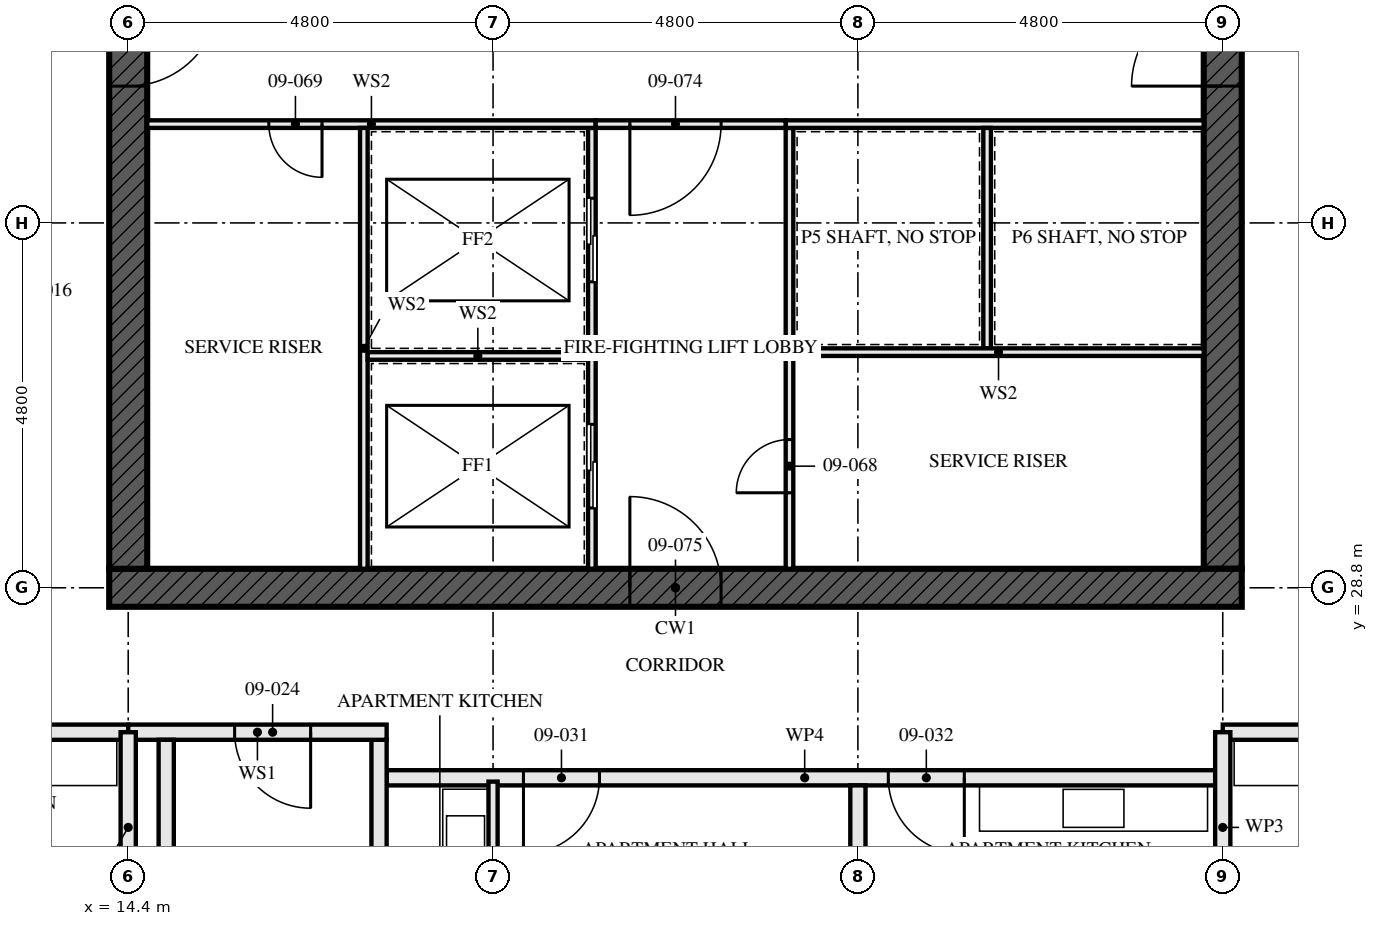
"""IFC4 building model, lengths in metres.
Left out: names, types, materials, properties, quantities, classifications, styles, units other than length and angle.
Written with IfcOpenShell. Run it as: python <this file> out.ifc"""

import sys

from ifc_helpers import new_model, si_unit, direction, frame, frame_2d, origin, place, context, subcontext, project, spatial, rectangle, extrude, element, fill, save


model = new_model("IFC4")
c1 = context("Model", 3, precision=1e-05, world=origin(), true_north=direction((0.0, 1.0)))
c2 = subcontext(c1, "Body", "Model", "MODEL_VIEW")
j1 = project(units=[si_unit("LENGTHUNIT", "METRE"), si_unit("PLANEANGLEUNIT", "RADIAN")], contexts=[c1])
p1 = place(None, origin())
s1 = spatial("IfcSite", under=j1, at=p1, CompositionType="ELEMENT")
p2 = place(p1, origin())
s2 = spatial("IfcBuilding", under=s1, at=p2, CompositionType="ELEMENT")
p3 = place(p2, frame((0.0, 0.0, 37.5)))
s3 = spatial("IfcBuildingStorey", under=s2, at=p3, CompositionType="ELEMENT", Elevation=37.5)
p4 = place(p3, frame((14.15, 28.8, -0.17), z_axis=(0.0, 0.0, 1.0), x_axis=(1.0, 0.0, 0.0)))
e1 = element("IfcWall", 1, at=p4, inside=s3, PredefinedType="SHEAR", context=c2, shape_type="SweptSolid", body=[
    extrude(rectangle(XDim=14.9, YDim=0.5, at=frame_2d((7.45, 0.0))), origin(), (0.0, 0.0, 1.0), 3.5),
])
p5 = place(p4, frame((6.85, 0.0, 0.17)))
e2 = element("IfcOpeningElement", 2, at=p5, cuts=e1, PredefinedType="OPENING", context=c2, shape_type="SweptSolid", body=[
    extrude(rectangle(XDim=1.2, YDim=2.1, at=frame_2d((0.6, 1.05))), frame((0.0, 0.26, 0.0), z_axis=(0.0, -1.0, 0.0), x_axis=(1.0, 0.0, 0.0)), (0.0, 0.0, 1.0), 0.521),
])
p6 = place(p3, frame((14.4, 42.95, -0.17), z_axis=(0.0, 0.0, 1.0), x_axis=(0.0, -1.0, 0.0)))
e3 = element("IfcWall", 3, at=p6, inside=s3, PredefinedType="SHEAR", context=c2, shape_type="SweptSolid", body=[
    extrude(rectangle(XDim=13.9, YDim=0.5, at=frame_2d((6.95, 0.0))), origin(), (0.0, 0.0, 1.0), 3.5),
])
p7 = place(p6, frame((6.35, 0.0, 0.17)))
e4 = element("IfcOpeningElement", 4, at=p7, cuts=e3, PredefinedType="OPENING", context=c2, shape_type="SweptSolid", body=[
    extrude(rectangle(XDim=1.2, YDim=2.1, at=frame_2d((0.6, 1.05))), frame((0.0, 0.26, 0.0), z_axis=(0.0, -1.0, 0.0), x_axis=(1.0, 0.0, 0.0)), (0.0, 0.0, 1.0), 0.521),
])
p8 = place(p3, frame((28.8, 29.05, -0.17), z_axis=(0.0, 0.0, 1.0), x_axis=(0.0, 1.0, 0.0)))
e5 = element("IfcWall", 5, at=p8, inside=s3, PredefinedType="SHEAR", context=c2, shape_type="SweptSolid", body=[
    extrude(rectangle(XDim=13.9, YDim=0.5, at=frame_2d((6.95, 0.0))), origin(), (0.0, 0.0, 1.0), 3.5),
])
p9 = place(p8, frame((6.35, 0.0, 0.17)))
e6 = element("IfcOpeningElement", 6, at=p9, cuts=e5, PredefinedType="OPENING", context=c2, shape_type="SweptSolid", body=[
    extrude(rectangle(XDim=1.2, YDim=2.1, at=frame_2d((0.6, 1.05))), frame((0.0, 0.26, 0.0), z_axis=(0.0, -1.0, 0.0), x_axis=(1.0, 0.0, 0.0)), (0.0, 0.0, 1.0), 0.521),
])
p10 = place(p3, frame((4.8, 26.9, 0.0), z_axis=(0.0, 0.0, 1.0), x_axis=(1.0, 0.0, 0.0)))
e7 = element("IfcWall", 7, at=p10, inside=s3, PredefinedType="PARTITIONING", context=c2, shape_type="SweptSolid", body=[
    extrude(rectangle(XDim=9.6, YDim=0.2, at=frame_2d((4.8, 0.0))), origin(), (0.0, 0.0, 1.0), 3.33),
])
p11 = place(p10, frame((0.4, 0.0, 0.0)))
e8 = element("IfcOpeningElement", 8, at=p11, cuts=e7, PredefinedType="OPENING", context=c2, shape_type="SweptSolid", body=[
    extrude(rectangle(XDim=1.0, YDim=2.1, at=frame_2d((0.5, 1.05))), frame((0.0, 0.111, 0.0), z_axis=(0.0, -1.0, 0.0), x_axis=(1.0, 0.0, 0.0)), (0.0, 0.0, 1.0), 0.221),
])
p12 = place(p10, frame((5.2, 0.0, 0.0)))
e9 = element("IfcOpeningElement", 9, at=p12, cuts=e7, PredefinedType="OPENING", context=c2, shape_type="SweptSolid", body=[
    extrude(rectangle(XDim=1.0, YDim=2.1, at=frame_2d((0.5, 1.05))), frame((0.0, 0.111, 0.0), z_axis=(0.0, -1.0, 0.0), x_axis=(1.0, 0.0, 0.0)), (0.0, 0.0, 1.0), 0.221),
])
for number, where, z_axis, x_axis in (
    (10, (14.9, 22.1, 0.0), (0.0, 0.0, 1.0), (0.0, 1.0, 0.0)),
    (11, (17.7, 22.1, 0.0), (0.0, 0.0, 1.0), (0.0, 1.0, 0.0)),
):
    element("IfcWall", number, at=place(p3, frame(where, z_axis=z_axis, x_axis=x_axis)), inside=s3, PredefinedType="SOLIDWALL", context=c2, shape_type="SweptSolid", body=[
        extrude(rectangle(XDim=4.7, YDim=0.2, at=frame_2d((2.35, 0.0))), origin(), (0.0, 0.0, 1.0), 2.99),
    ])
p13 = place(p3, frame((14.4, 26.9, 0.0), z_axis=(0.0, 0.0, 1.0), x_axis=(1.0, 0.0, 0.0)))
e12 = element("IfcWall", 12, at=p13, inside=s3, PredefinedType="SOLIDWALL", context=c2, shape_type="SweptSolid", body=[
    extrude(rectangle(XDim=3.4, YDim=0.2, at=frame_2d((1.7, 0.0))), origin(), (0.0, 0.0, 1.0), 3.33),
])
p14 = place(p13, frame((1.4, 0.0, 0.0)))
e13 = element("IfcOpeningElement", 13, at=p14, cuts=e12, PredefinedType="OPENING", context=c2, shape_type="SweptSolid", body=[
    extrude(rectangle(XDim=1.0, YDim=2.1, at=frame_2d((0.5, 1.05))), frame((0.0, 0.111, 0.0), z_axis=(0.0, -1.0, 0.0), x_axis=(1.0, 0.0, 0.0)), (0.0, 0.0, 1.0), 0.221),
])
p15 = place(p3, frame((19.2, 21.6, 0.0), z_axis=(0.0, 0.0, 1.0), x_axis=(0.0, 1.0, 0.0)))
e14 = element("IfcWall", 14, at=p15, inside=s3, PredefinedType="PARTITIONING", context=c2, shape_type="SweptSolid", body=[
    extrude(rectangle(XDim=4.65, YDim=0.12, at=frame_2d((2.325, 0.0))), origin(), (0.0, 0.0, 1.0), 2.55),
])
p16 = place(p15, frame((1.875, 0.0, 0.0)))
e15 = element("IfcOpeningElement", 15, at=p16, cuts=e14, PredefinedType="OPENING", context=c2, shape_type="SweptSolid", body=[
    extrude(rectangle(XDim=0.9, YDim=2.1, at=frame_2d((0.45, 1.05))), frame((0.0, 0.071, 0.0), z_axis=(0.0, -1.0, 0.0), x_axis=(1.0, 0.0, 0.0)), (0.0, 0.0, 1.0), 0.141),
])
p17 = place(p3, frame((24.0, 14.795, 0.0), z_axis=(0.0, 0.0, 1.0), x_axis=(0.0, 1.0, 0.0)))
e16 = element("IfcWall", 16, at=p17, inside=s3, PredefinedType="PARTITIONING", context=c2, shape_type="SweptSolid", body=[
    extrude(rectangle(XDim=11.405, YDim=0.2, at=frame_2d((5.703, 0.0))), origin(), (0.0, 0.0, 1.0), 2.55),
])
p18 = place(p3, frame((17.8, 26.3, 0.0), z_axis=(0.0, 0.0, 1.0), x_axis=(1.0, 0.0, 0.0)))
e17 = element("IfcWall", 17, at=p18, inside=s3, PredefinedType="PARTITIONING", context=c2, shape_type="SweptSolid", body=[
    extrude(rectangle(XDim=11.0, YDim=0.2, at=frame_2d((5.5, 0.0))), origin(), (0.0, 0.0, 1.0), 2.55),
])
p19 = place(p18, frame((1.8, 0.0, 0.0)))
e18 = element("IfcOpeningElement", 18, at=p19, cuts=e17, PredefinedType="OPENING", context=c2, shape_type="SweptSolid", body=[
    extrude(rectangle(XDim=1.0, YDim=2.1, at=frame_2d((0.5, 1.05))), frame((0.0, 0.111, 0.0), z_axis=(0.0, -1.0, 0.0), x_axis=(1.0, 0.0, 0.0)), (0.0, 0.0, 1.0), 0.221),
])
p20 = place(p18, frame((6.6, 0.0, 0.0)))
e19 = element("IfcOpeningElement", 19, at=p20, cuts=e17, PredefinedType="OPENING", context=c2, shape_type="SweptSolid", body=[
    extrude(rectangle(XDim=1.0, YDim=2.1, at=frame_2d((0.5, 1.05))), frame((0.0, 0.111, 0.0), z_axis=(0.0, -1.0, 0.0), x_axis=(1.0, 0.0, 0.0)), (0.0, 0.0, 1.0), 0.221),
])
p21 = place(p3, frame((28.8, 26.9, 0.0), z_axis=(0.0, 0.0, 1.0), x_axis=(1.0, 0.0, 0.0)))
e20 = element("IfcWall", 20, at=p21, inside=s3, PredefinedType="PARTITIONING", context=c2, shape_type="SweptSolid", body=[
    extrude(rectangle(XDim=9.6, YDim=0.2, at=frame_2d((4.8, 0.0))), origin(), (0.0, 0.0, 1.0), 3.33),
])
p22 = place(p21, frame((5.2, 0.0, 0.0)))
e21 = element("IfcOpeningElement", 21, at=p22, cuts=e20, PredefinedType="OPENING", context=c2, shape_type="SweptSolid", body=[
    extrude(rectangle(XDim=1.0, YDim=2.1, at=frame_2d((0.5, 1.05))), frame((0.0, 0.111, 0.0), z_axis=(0.0, -1.0, 0.0), x_axis=(1.0, 0.0, 0.0)), (0.0, 0.0, 1.0), 0.221),
])
p23 = place(p3, frame((20.5, 29.05, 0.0), z_axis=(0.0, 0.0, 1.0), x_axis=(0.0, 1.0, 0.0)))
e22 = element("IfcWall", 22, at=p23, inside=s3, PredefinedType="SOLIDWALL", context=c2, shape_type="SweptSolid", body=[
    extrude(rectangle(XDim=5.8, YDim=0.1, at=frame_2d((2.9, 0.0))), origin(), (0.0, 0.0, 1.0), 3.33),
])
p24 = place(p23, frame((0.8, 0.0, 0.0)))
e23 = element("IfcOpeningElement", 23, at=p24, cuts=e22, PredefinedType="OPENING", context=c2, shape_type="SweptSolid", body=[
    extrude(rectangle(XDim=1.1, YDim=2.3, at=frame_2d((0.55, 1.15))), frame((0.0, 0.061, 0.0), z_axis=(0.0, -1.0, 0.0), x_axis=(1.0, 0.0, 0.0)), (0.0, 0.0, 1.0), 0.121),
])
p25 = place(p23, frame((3.775, 0.0, 0.0)))
e24 = element("IfcOpeningElement", 24, at=p25, cuts=e22, PredefinedType="OPENING", context=c2, shape_type="SweptSolid", body=[
    extrude(rectangle(XDim=1.1, YDim=2.3, at=frame_2d((0.55, 1.15))), frame((0.0, 0.061, 0.0), z_axis=(0.0, -1.0, 0.0), x_axis=(1.0, 0.0, 0.0)), (0.0, 0.0, 1.0), 0.121),
])
p26 = place(p3, frame((23.1, 29.05, 0.0), z_axis=(0.0, 0.0, 1.0), x_axis=(0.0, 1.0, 0.0)))
e25 = element("IfcWall", 25, at=p26, inside=s3, PredefinedType="SOLIDWALL", context=c2, shape_type="SweptSolid", body=[
    extrude(rectangle(XDim=5.8, YDim=0.1, at=frame_2d((2.9, 0.0))), origin(), (0.0, 0.0, 1.0), 3.33),
])
p27 = place(p26, frame((1.0, 0.0, 0.0)))
e26 = element("IfcOpeningElement", 26, at=p27, cuts=e25, PredefinedType="OPENING", context=c2, shape_type="SweptSolid", body=[
    extrude(rectangle(XDim=0.7, YDim=2.1, at=frame_2d((0.35, 1.05))), frame((0.0, 0.061, 0.0), z_axis=(0.0, -1.0, 0.0), x_axis=(1.0, 0.0, 0.0)), (0.0, 0.0, 1.0), 0.121),
])
p28 = place(p3, frame((14.65, 34.9, 0.0), z_axis=(0.0, 0.0, 1.0), x_axis=(1.0, 0.0, 0.0)))
e27 = element("IfcWall", 27, at=p28, inside=s3, PredefinedType="SOLIDWALL", context=c2, shape_type="SweptSolid", body=[
    extrude(rectangle(XDim=5.9, YDim=0.1, at=frame_2d((2.95, 0.0))), origin(), (0.0, 0.0, 1.0), 3.33),
])
p29 = place(p28, frame((1.6, 0.0, 0.0)))
e28 = element("IfcOpeningElement", 28, at=p29, cuts=e27, PredefinedType="OPENING", context=c2, shape_type="SweptSolid", body=[
    extrude(rectangle(XDim=0.7, YDim=2.1, at=frame_2d((0.35, 1.05))), frame((0.0, 0.061, 0.0), z_axis=(0.0, -1.0, 0.0), x_axis=(1.0, 0.0, 0.0)), (0.0, 0.0, 1.0), 0.121),
])
p30 = place(p3, frame((23.05, 34.9, 0.0), z_axis=(0.0, 0.0, 1.0), x_axis=(1.0, 0.0, 0.0)))
e29 = element("IfcWall", 29, at=p30, inside=s3, PredefinedType="SOLIDWALL", context=c2, shape_type="SweptSolid", body=[
    extrude(rectangle(XDim=5.5, YDim=0.1, at=frame_2d((2.75, 0.0))), origin(), (0.0, 0.0, 1.0), 3.33),
])
p31 = place(p3, frame((20.55, 34.9, 0.0), z_axis=(0.0, 0.0, 1.0), x_axis=(1.0, 0.0, 0.0)))
e30 = element("IfcWall", 30, at=p31, inside=s3, PredefinedType="SOLIDWALL", context=c2, shape_type="SweptSolid", body=[
    extrude(rectangle(XDim=2.5, YDim=0.1, at=frame_2d((1.25, 0.0))), origin(), (0.0, 0.0, 1.0), 3.33),
])
p32 = place(p31, frame((0.45, 0.0, 0.0)))
e31 = element("IfcOpeningElement", 31, at=p32, cuts=e30, PredefinedType="OPENING", context=c2, shape_type="SweptSolid", body=[
    extrude(rectangle(XDim=1.2, YDim=2.1, at=frame_2d((0.6, 1.05))), frame((0.0, 0.061, 0.0), z_axis=(0.0, -1.0, 0.0), x_axis=(1.0, 0.0, 0.0)), (0.0, 0.0, 1.0), 0.121),
])
p33 = place(p3, frame((17.5, 29.05, 0.0), z_axis=(0.0, 0.0, 1.0), x_axis=(0.0, 1.0, 0.0)))
e32 = element("IfcWall", 32, at=p33, inside=s3, PredefinedType="SOLIDWALL", context=c2, shape_type="SweptSolid", body=[
    extrude(rectangle(XDim=5.8, YDim=0.1, at=frame_2d((2.9, 0.0))), origin(), (0.0, 0.0, 1.0), 3.33),
])
p34 = place(p3, frame((17.55, 31.85, 0.0), z_axis=(0.0, 0.0, 1.0), x_axis=(1.0, 0.0, 0.0)))
e33 = element("IfcWall", 33, at=p34, inside=s3, PredefinedType="SOLIDWALL", context=c2, shape_type="SweptSolid", body=[
    extrude(rectangle(XDim=2.9, YDim=0.1, at=frame_2d((1.45, 0.0))), origin(), (0.0, 0.0, 1.0), 3.33),
])
p35 = place(p3, frame((25.7, 31.95, 0.0), z_axis=(0.0, 0.0, 1.0), x_axis=(0.0, 1.0, 0.0)))
e34 = element("IfcWall", 34, at=p35, inside=s3, PredefinedType="SOLIDWALL", context=c2, shape_type="SweptSolid", body=[
    extrude(rectangle(XDim=2.9, YDim=0.1, at=frame_2d((1.45, 0.0))), origin(), (0.0, 0.0, 1.0), 3.33),
])
p36 = place(p3, frame((23.15, 31.9, 0.0), z_axis=(0.0, 0.0, 1.0), x_axis=(1.0, 0.0, 0.0)))
e35 = element("IfcWall", 35, at=p36, inside=s3, PredefinedType="SOLIDWALL", context=c2, shape_type="SweptSolid", body=[
    extrude(rectangle(XDim=5.4, YDim=0.1, at=frame_2d((2.7, 0.0))), origin(), (0.0, 0.0, 1.0), 3.33),
])
for number, where, z_axis, x_axis in (
    (36, (14.4, 24.395, 0.0), (0.0, 0.0, 1.0), (0.0, 1.0, 0.0)),
    (37, (28.8, 24.395, 0.0), (0.0, 0.0, 1.0), (0.0, 1.0, 0.0)),
):
    element("IfcWall", number, at=place(p3, frame(where, z_axis=z_axis, x_axis=x_axis)), inside=s3, PredefinedType="PARTITIONING", context=c2, shape_type="SweptSolid", body=[
        extrude(rectangle(XDim=2.505, YDim=0.2, at=frame_2d((1.252, 0.0))), origin(), (0.0, 0.0, 1.0), 2.32),
    ])
p37 = place(p14, frame((1.0, 0.0, 0.0), z_axis=(0.0, 0.0, 1.0), x_axis=(-1.0, 0.0, 0.0)))
e38 = element("IfcDoor", 38, at=p37, inside=s3, OperationType="SINGLE_SWING_RIGHT", PredefinedType="DOOR", context=c2, shape_type="SweptSolid", body=[
    extrude(rectangle(XDim=1.0, YDim=2.1, at=frame_2d((0.5, 1.05))), frame((0.0, 0.032, 0.0), z_axis=(0.0, -1.0, 0.0), x_axis=(1.0, 0.0, 0.0)), (0.0, 0.0, 1.0), 0.064),
])
fill(e13, e38)
p38 = place(p19, frame((1.0, 0.0, 0.0), z_axis=(0.0, 0.0, 1.0), x_axis=(-1.0, 0.0, 0.0)))
e39 = element("IfcDoor", 39, at=p38, inside=s3, OperationType="SINGLE_SWING_LEFT", PredefinedType="DOOR", context=c2, shape_type="SweptSolid", body=[
    extrude(rectangle(XDim=1.0, YDim=2.1, at=frame_2d((0.5, 1.05))), frame((0.0, 0.027, 0.0), z_axis=(0.0, -1.0, 0.0), x_axis=(1.0, 0.0, 0.0)), (0.0, 0.0, 1.0), 0.054),
])
fill(e18, e39)
p39 = place(p20, frame((1.0, 0.0, 0.0), z_axis=(0.0, 0.0, 1.0), x_axis=(-1.0, 0.0, 0.0)))
e40 = element("IfcDoor", 40, at=p39, inside=s3, OperationType="SINGLE_SWING_RIGHT", PredefinedType="DOOR", context=c2, shape_type="SweptSolid", body=[
    extrude(rectangle(XDim=1.0, YDim=2.1, at=frame_2d((0.5, 1.05))), frame((0.0, 0.027, 0.0), z_axis=(0.0, -1.0, 0.0), x_axis=(1.0, 0.0, 0.0)), (0.0, 0.0, 1.0), 0.054),
])
fill(e19, e40)
p40 = place(p24, origin())
e41 = element("IfcDoor", 41, at=p40, inside=s3, OperationType="SLIDING_TO_LEFT", PredefinedType="DOOR", context=c2, shape_type="SweptSolid", body=[
    extrude(rectangle(XDim=1.1, YDim=2.3, at=frame_2d((0.55, 1.15))), frame((0.0, 0.05, 0.0), z_axis=(0.0, -1.0, 0.0), x_axis=(1.0, 0.0, 0.0)), (0.0, 0.0, 1.0), 0.1),
])
fill(e23, e41)
p41 = place(p25, origin())
e42 = element("IfcDoor", 42, at=p41, inside=s3, OperationType="SLIDING_TO_LEFT", PredefinedType="DOOR", context=c2, shape_type="SweptSolid", body=[
    extrude(rectangle(XDim=1.1, YDim=2.3, at=frame_2d((0.55, 1.15))), frame((0.0, 0.05, 0.0), z_axis=(0.0, -1.0, 0.0), x_axis=(1.0, 0.0, 0.0)), (0.0, 0.0, 1.0), 0.1),
])
fill(e24, e42)
p42 = place(p27, origin())
e43 = element("IfcDoor", 43, at=p42, inside=s3, OperationType="SINGLE_SWING_RIGHT", PredefinedType="DOOR", context=c2, shape_type="SweptSolid", body=[
    extrude(rectangle(XDim=0.7, YDim=2.1, at=frame_2d((0.35, 1.05))), frame((0.0, 0.027, 0.0), z_axis=(0.0, -1.0, 0.0), x_axis=(1.0, 0.0, 0.0)), (0.0, 0.0, 1.0), 0.054),
])
fill(e26, e43)
p43 = place(p29, frame((0.7, 0.0, 0.0), z_axis=(0.0, 0.0, 1.0), x_axis=(-1.0, 0.0, 0.0)))
e44 = element("IfcDoor", 44, at=p43, inside=s3, OperationType="SINGLE_SWING_RIGHT", PredefinedType="DOOR", context=c2, shape_type="SweptSolid", body=[
    extrude(rectangle(XDim=0.7, YDim=2.1, at=frame_2d((0.35, 1.05))), frame((0.0, 0.027, 0.0), z_axis=(0.0, -1.0, 0.0), x_axis=(1.0, 0.0, 0.0)), (0.0, 0.0, 1.0), 0.054),
])
fill(e28, e44)
p44 = place(p32, frame((1.2, 0.0, 0.0), z_axis=(0.0, 0.0, 1.0), x_axis=(-1.0, 0.0, 0.0)))
e45 = element("IfcDoor", 45, at=p44, inside=s3, OperationType="SINGLE_SWING_LEFT", PredefinedType="DOOR", context=c2, shape_type="SweptSolid", body=[
    extrude(rectangle(XDim=1.2, YDim=2.1, at=frame_2d((0.6, 1.05))), frame((0.0, 0.027, 0.0), z_axis=(0.0, -1.0, 0.0), x_axis=(1.0, 0.0, 0.0)), (0.0, 0.0, 1.0), 0.054),
])
fill(e31, e45)
p45 = place(p5, origin())
e46 = element("IfcDoor", 46, at=p45, inside=s3, OperationType="SINGLE_SWING_LEFT", PredefinedType="DOOR", context=c2, shape_type="SweptSolid", body=[
    extrude(rectangle(XDim=1.2, YDim=2.1, at=frame_2d((0.6, 1.05))), frame((0.0, 0.027, 0.0), z_axis=(0.0, -1.0, 0.0), x_axis=(1.0, 0.0, 0.0)), (0.0, 0.0, 1.0), 0.054),
])
fill(e2, e46)
p46 = place(p7, origin())
e47 = element("IfcDoor", 47, at=p46, inside=s3, OperationType="SINGLE_SWING_LEFT", PredefinedType="DOOR", context=c2, shape_type="SweptSolid", body=[
    extrude(rectangle(XDim=1.2, YDim=2.1, at=frame_2d((0.6, 1.05))), frame((0.0, 0.027, 0.0), z_axis=(0.0, -1.0, 0.0), x_axis=(1.0, 0.0, 0.0)), (0.0, 0.0, 1.0), 0.054),
])
fill(e4, e47)
p47 = place(p9, origin())
e48 = element("IfcDoor", 48, at=p47, inside=s3, OperationType="SINGLE_SWING_LEFT", PredefinedType="DOOR", context=c2, shape_type="SweptSolid", body=[
    extrude(rectangle(XDim=1.2, YDim=2.1, at=frame_2d((0.6, 1.05))), frame((0.0, 0.027, 0.0), z_axis=(0.0, -1.0, 0.0), x_axis=(1.0, 0.0, 0.0)), (0.0, 0.0, 1.0), 0.054),
])
fill(e6, e48)
save(model, sys.argv[1])
